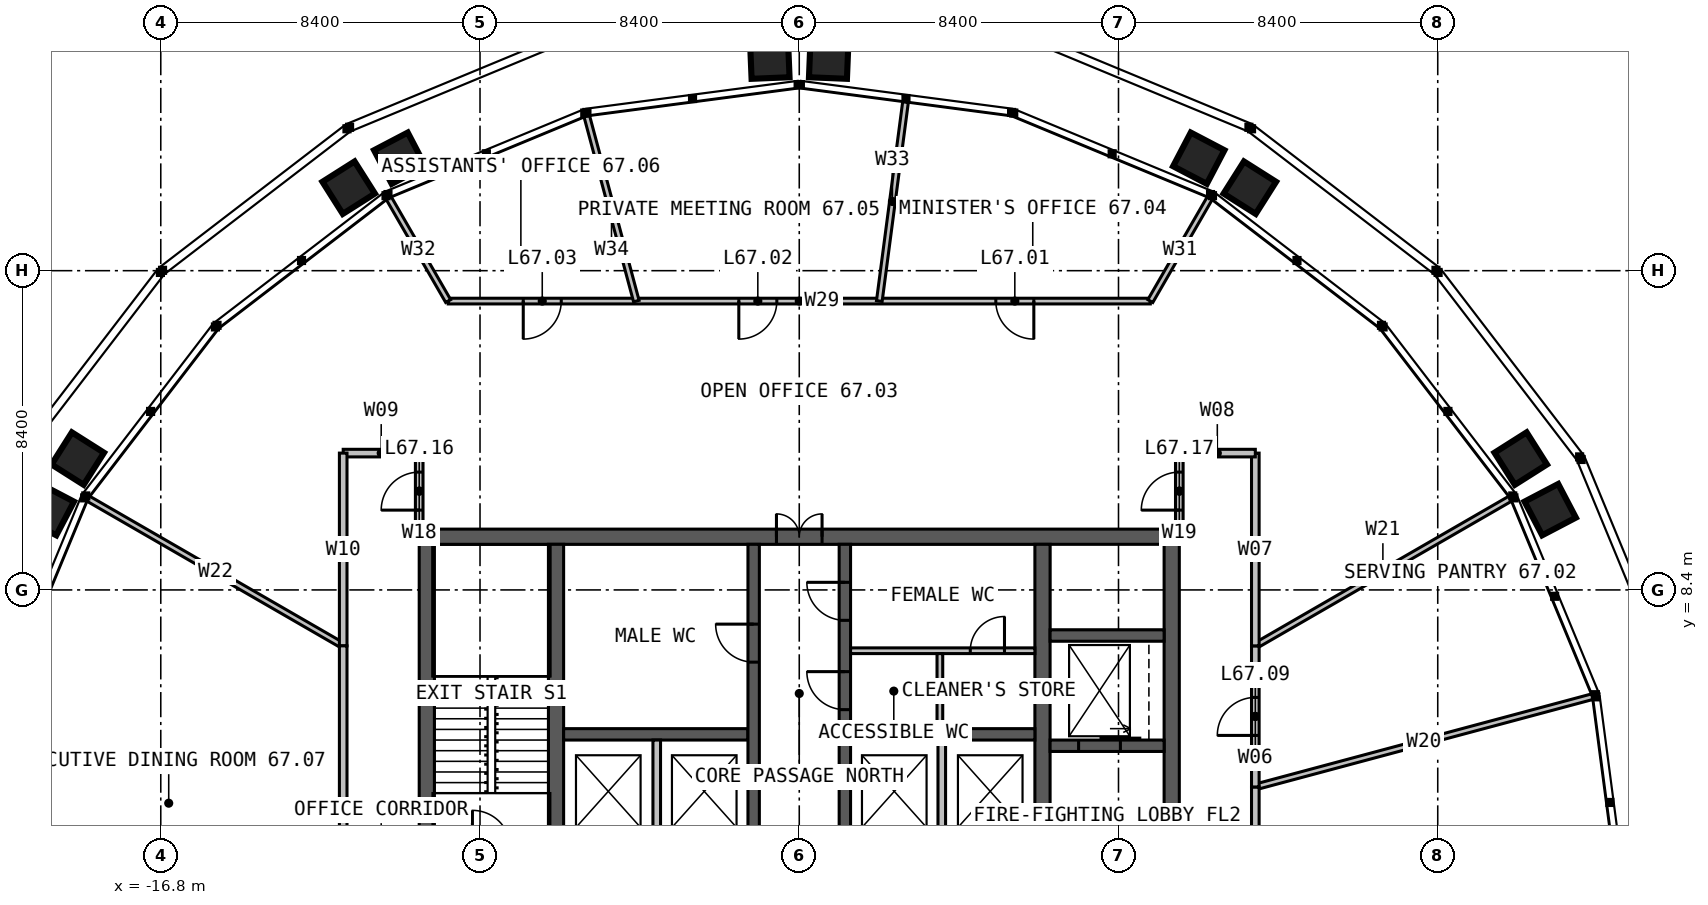
"""IFC4 building model, lengths in metres.
Left out: names, types, materials, properties, quantities, classifications, styles, units other than length and angle.
Written with IfcOpenShell. Run it as: python <this file> out.ifc"""

import sys

from ifc_helpers import new_model, si_unit, direction, frame, frame_2d, origin, place, context, subcontext, project, spatial, rectangle, extrude, element, fill, save


model = new_model("IFC4")
c1 = context("Model", 3, precision=1e-05, world=origin(), true_north=direction((0.0, 1.0)))
c2 = subcontext(c1, "Body", "Model", "MODEL_VIEW")
j1 = project(units=[si_unit("LENGTHUNIT", "METRE"), si_unit("PLANEANGLEUNIT", "RADIAN")], contexts=[c1])
p1 = place(None, origin())
s1 = spatial("IfcSite", under=j1, at=p1, CompositionType="ELEMENT")
p2 = place(p1, origin())
s2 = spatial("IfcBuilding", under=s1, at=p2, CompositionType="ELEMENT")
p3 = place(p2, frame((0.0, 0.0, 276.0)))
s3 = spatial("IfcBuildingStorey", under=s2, at=p3, CompositionType="ELEMENT", Elevation=276.0)
p4 = place(p3, frame((-10.0, 9.8, 0.0), z_axis=(0.0, 0.0, 1.0), x_axis=(1.0, 0.0, 0.0)))
e1 = element("IfcWall", 1, at=p4, inside=s3, PredefinedType="SOLIDWALL", context=c2, shape_type="SweptSolid", body=[
    extrude(rectangle(XDim=20.0, YDim=0.4, at=frame_2d((10.0, 0.0))), origin(), (0.0, 0.0, 1.0), 4.0),
])
p5 = place(p4, frame((9.4, 0.0, 0.0)))
e2 = element("IfcOpeningElement", 2, at=p5, cuts=e1, PredefinedType="OPENING", context=c2, shape_type="SweptSolid", body=[
    extrude(rectangle(XDim=1.2, YDim=2.2, at=frame_2d((0.6, 1.1))), frame((0.0, 0.21, 0.0), z_axis=(0.0, -1.0, 0.0), x_axis=(1.0, 0.0, 0.0)), (0.0, 0.0, 1.0), 0.42),
])
for number, where, z_axis, x_axis in (
    (3, (9.8, -9.6, 0.0), (0.0, 0.0, 1.0), (0.0, 1.0, 0.0)),
    (4, (-9.8, 9.6, 0.0), (0.0, 0.0, 1.0), (0.0, -1.0, 0.0)),
):
    element("IfcWall", number, at=place(p3, frame(where, z_axis=z_axis, x_axis=x_axis)), inside=s3, PredefinedType="SOLIDWALL", context=c2, shape_type="SweptSolid", body=[
        extrude(rectangle(XDim=19.2, YDim=0.4, at=frame_2d((9.6, 0.0))), origin(), (0.0, 0.0, 1.0), 4.0),
    ])
p6 = place(p3, frame((-6.4, -9.6, 0.0), z_axis=(0.0, 0.0, 1.0), x_axis=(0.0, 1.0, 0.0)))
e5 = element("IfcWall", 5, at=p6, inside=s3, PredefinedType="SOLIDWALL", context=c2, shape_type="SweptSolid", body=[
    extrude(rectangle(XDim=19.2, YDim=0.4, at=frame_2d((9.6, 0.0))), origin(), (0.0, 0.0, 1.0), 4.0),
])
p7 = place(p6, frame((9.1, 0.0, 0.0)))
e6 = element("IfcOpeningElement", 6, at=p7, cuts=e5, PredefinedType="OPENING", context=c2, shape_type="SweptSolid", body=[
    extrude(rectangle(XDim=1.0, YDim=2.2, at=frame_2d((0.5, 1.1))), frame((0.0, 0.21, 0.0), z_axis=(0.0, -1.0, 0.0), x_axis=(1.0, 0.0, 0.0)), (0.0, 0.0, 1.0), 0.42),
])
p8 = place(p3, frame((6.4, 9.6, 0.0), z_axis=(0.0, 0.0, 1.0), x_axis=(0.0, -1.0, 0.0)))
e7 = element("IfcWall", 7, at=p8, inside=s3, PredefinedType="SOLIDWALL", context=c2, shape_type="SweptSolid", body=[
    extrude(rectangle(XDim=19.2, YDim=0.4, at=frame_2d((9.6, 0.0))), origin(), (0.0, 0.0, 1.0), 4.0),
])
p9 = place(p8, frame((9.1, 0.0, 0.0)))
e8 = element("IfcOpeningElement", 8, at=p9, cuts=e7, PredefinedType="OPENING", context=c2, shape_type="SweptSolid", body=[
    extrude(rectangle(XDim=1.0, YDim=2.2, at=frame_2d((0.5, 1.1))), frame((0.0, 0.21, 0.0), z_axis=(0.0, -1.0, 0.0), x_axis=(1.0, 0.0, 0.0)), (0.0, 0.0, 1.0), 0.42),
])
for number, where, z_axis, x_axis in (
    (9, (-6.2, 4.6, 0.0), (0.0, 0.0, 1.0), (1.0, 0.0, 0.0)),
    (10, (1.35, 4.6, 0.0), (0.0, 0.0, 1.0), (1.0, 0.0, 0.0)),
):
    element("IfcWall", number, at=place(p3, frame(where, z_axis=z_axis, x_axis=x_axis)), inside=s3, PredefinedType="SOLIDWALL", context=c2, shape_type="SweptSolid", body=[
        extrude(rectangle(XDim=4.85, YDim=0.3, at=frame_2d((2.425, 0.0))), origin(), (0.0, 0.0, 1.0), 4.0),
    ])
p10 = place(p3, frame((-1.2, 1.45, 0.0), z_axis=(0.0, 0.0, 1.0), x_axis=(0.0, 1.0, 0.0)))
e11 = element("IfcWall", 11, at=p10, inside=s3, PredefinedType="SOLIDWALL", context=c2, shape_type="SweptSolid", body=[
    extrude(rectangle(XDim=8.15, YDim=0.3, at=frame_2d((4.075, 0.0))), origin(), (0.0, 0.0, 1.0), 4.0),
])
p11 = place(p10, frame((5.05, 0.0, 0.0)))
e12 = element("IfcOpeningElement", 12, at=p11, cuts=e11, PredefinedType="OPENING", context=c2, shape_type="SweptSolid", body=[
    extrude(rectangle(XDim=1.0, YDim=2.2, at=frame_2d((0.5, 1.1))), frame((0.0, 0.16, 0.0), z_axis=(0.0, -1.0, 0.0), x_axis=(1.0, 0.0, 0.0)), (0.0, 0.0, 1.0), 0.32),
])
p12 = place(p3, frame((1.2, 1.45, 0.0), z_axis=(0.0, 0.0, 1.0), x_axis=(0.0, 1.0, 0.0)))
e13 = element("IfcWall", 13, at=p12, inside=s3, PredefinedType="SOLIDWALL", context=c2, shape_type="SweptSolid", body=[
    extrude(rectangle(XDim=8.15, YDim=0.3, at=frame_2d((4.075, 0.0))), origin(), (0.0, 0.0, 1.0), 4.0),
])
p13 = place(p12, frame((3.8, 0.0, 0.0)))
e14 = element("IfcOpeningElement", 14, at=p13, cuts=e13, PredefinedType="OPENING", context=c2, shape_type="SweptSolid", body=[
    extrude(rectangle(XDim=1.0, YDim=2.2, at=frame_2d((0.5, 1.1))), frame((0.0, 0.16, 0.0), z_axis=(0.0, -1.0, 0.0), x_axis=(1.0, 0.0, 0.0)), (0.0, 0.0, 1.0), 0.32),
])
p14 = place(p12, frame((6.15, 0.0, 0.0)))
e15 = element("IfcOpeningElement", 15, at=p14, cuts=e13, PredefinedType="OPENING", context=c2, shape_type="SweptSolid", body=[
    extrude(rectangle(XDim=1.0, YDim=2.2, at=frame_2d((0.5, 1.1))), frame((0.0, 0.16, 0.0), z_axis=(0.0, -1.0, 0.0), x_axis=(1.0, 0.0, 0.0)), (0.0, 0.0, 1.0), 0.32),
])
p15 = place(p3, frame((6.6, 4.3, 0.0), z_axis=(0.0, 0.0, 1.0), x_axis=(1.0, 0.0, 0.0)))
e16 = element("IfcWall", 16, at=p15, inside=s3, PredefinedType="SOLIDWALL", context=c2, shape_type="SweptSolid", body=[
    extrude(rectangle(XDim=3.0, YDim=0.3, at=frame_2d((1.5, 0.0))), origin(), (0.0, 0.0, 1.0), 4.0),
])
p16 = place(p15, frame((0.75, 0.0, 0.0)))
e17 = element("IfcOpeningElement", 17, at=p16, cuts=e16, PredefinedType="OPENING", context=c2, shape_type="SweptSolid", body=[
    extrude(rectangle(XDim=1.1, YDim=2.2, at=frame_2d((0.55, 1.1))), frame((0.0, 0.16, 0.0), z_axis=(0.0, -1.0, 0.0), x_axis=(1.0, 0.0, 0.0)), (0.0, 0.0, 1.0), 0.32),
])
p17 = place(p3, frame((6.6, 7.2, 0.0), z_axis=(0.0, 0.0, 1.0), x_axis=(1.0, 0.0, 0.0)))
e18 = element("IfcWall", 18, at=p17, inside=s3, PredefinedType="SOLIDWALL", context=c2, shape_type="SweptSolid", body=[
    extrude(rectangle(XDim=3.0, YDim=0.3, at=frame_2d((1.5, 0.0))), origin(), (0.0, 0.0, 1.0), 4.0),
])
for number, where, z_axis, x_axis in (
    (19, (-3.75, 1.75, 0.0), (0.0, 0.0, 1.0), (0.0, 1.0, 0.0)),
    (20, (3.75, 1.75, 0.0), (0.0, 0.0, 1.0), (0.0, 1.0, 0.0)),
):
    element("IfcWall", number, at=place(p3, frame(where, z_axis=z_axis, x_axis=x_axis)), inside=s3, PredefinedType="SOLIDWALL", context=c2, shape_type="SweptSolid", body=[
        extrude(rectangle(XDim=2.7, YDim=0.2, at=frame_2d((1.35, 0.0))), origin(), (0.0, 0.0, 1.0), 3.75),
    ])
p18 = place(p3, frame((1.35, 6.8, 0.0), z_axis=(0.0, 0.0, 1.0), x_axis=(1.0, 0.0, 0.0)))
e21 = element("IfcWall", 21, at=p18, inside=s3, PredefinedType="PARTITIONING", context=c2, shape_type="SweptSolid", body=[
    extrude(rectangle(XDim=4.85, YDim=0.15, at=frame_2d((2.425, 0.0))), origin(), (0.0, 0.0, 1.0), 3.75),
])
p19 = place(p18, frame((3.15, 0.0, 0.0)))
e22 = element("IfcOpeningElement", 22, at=p19, cuts=e21, PredefinedType="OPENING", context=c2, shape_type="SweptSolid", body=[
    extrude(rectangle(XDim=0.9, YDim=2.2, at=frame_2d((0.45, 1.1))), frame((0.0, 0.085, 0.0), z_axis=(0.0, -1.0, 0.0), x_axis=(1.0, 0.0, 0.0)), (0.0, 0.0, 1.0), 0.17),
])
p20 = place(p3, frame((3.7, 4.75, 0.0), z_axis=(0.0, 0.0, 1.0), x_axis=(0.0, 1.0, 0.0)))
e23 = element("IfcWall", 23, at=p20, inside=s3, PredefinedType="PARTITIONING", context=c2, shape_type="SweptSolid", body=[
    extrude(rectangle(XDim=1.975, YDim=0.15, at=frame_2d((0.988, 0.0))), origin(), (0.0, 0.0, 1.0), 3.75),
])
p21 = place(p3, frame((12.0, 3.215, 0.0), z_axis=(0.0, 0.0, 1.0), x_axis=(0.965925864192, 0.258818903647, 0.0)))
e24 = element("IfcWall", 24, at=p21, inside=s3, PredefinedType="PARTITIONING", context=c2, shape_type="SweptSolid", body=[
    extrude(rectangle(XDim=9.185, YDim=0.15, at=frame_2d((4.592, 0.0))), origin(), (0.0, 0.0, 1.0), 2.79),
])
for number, where, z_axis, x_axis in (
    (25, (12.0, 6.928, 0.0), (0.0, 0.0, 1.0), (0.866, 0.5, 0.0)),
    (26, (-12.0, 6.928, 0.0), (0.0, 0.0, 1.0), (-0.866, 0.5, 0.0)),
):
    element("IfcWall", number, at=place(p3, frame(where, z_axis=z_axis, x_axis=x_axis)), inside=s3, PredefinedType="PARTITIONING", context=c2, shape_type="SweptSolid", body=[
        extrude(rectangle(XDim=7.752, YDim=0.15, at=frame_2d((3.876, 0.0))), origin(), (0.0, 0.0, 1.0), 2.79),
    ])
p22 = place(p3, frame((12.0, -6.928, 0.0), z_axis=(0.0, 0.0, 1.0), x_axis=(0.0, 1.0, 0.0)))
e27 = element("IfcWall", 27, at=p22, inside=s3, PredefinedType="PARTITIONING", context=c2, shape_type="SweptSolid", body=[
    extrude(rectangle(XDim=10.144, YDim=0.2, at=frame_2d((5.072, 0.0))), origin(), (0.0, 0.0, 1.0), 3.8),
])
p23 = place(p22, frame((4.172, 0.0, 0.0)))
e28 = element("IfcOpeningElement", 28, at=p23, cuts=e27, PredefinedType="OPENING", context=c2, shape_type="SweptSolid", body=[
    extrude(rectangle(XDim=1.8, YDim=2.2, at=frame_2d((0.9, 1.1))), frame((0.0, 0.11, 0.0), z_axis=(0.0, -1.0, 0.0), x_axis=(1.0, 0.0, 0.0)), (0.0, 0.0, 1.0), 0.22),
])
p24 = place(p3, frame((12.0, 3.215, 0.0), z_axis=(0.0, 0.0, 1.0), x_axis=(0.0, 1.0, 0.0)))
e29 = element("IfcWall", 29, at=p24, inside=s3, PredefinedType="PARTITIONING", context=c2, shape_type="SweptSolid", body=[
    extrude(rectangle(XDim=3.713, YDim=0.2, at=frame_2d((1.856, 0.0))), origin(), (0.0, 0.0, 1.0), 3.8),
])
p25 = place(p24, frame((1.356, 0.0, 0.0)))
e30 = element("IfcOpeningElement", 30, at=p25, cuts=e29, PredefinedType="OPENING", context=c2, shape_type="SweptSolid", body=[
    extrude(rectangle(XDim=1.0, YDim=2.2, at=frame_2d((0.5, 1.1))), frame((0.0, 0.11, 0.0), z_axis=(0.0, -1.0, 0.0), x_axis=(1.0, 0.0, 0.0)), (0.0, 0.0, 1.0), 0.22),
])
p26 = place(p3, frame((12.0, 6.928, 0.0), z_axis=(0.0, 0.0, 1.0), x_axis=(0.0, 1.0, 0.0)))
e31 = element("IfcWall", 31, at=p26, inside=s3, PredefinedType="PARTITIONING", context=c2, shape_type="SweptSolid", body=[
    extrude(rectangle(XDim=5.072, YDim=0.2, at=frame_2d((2.536, 0.0))), origin(), (0.0, 0.0, 1.0), 3.8),
])
p27 = place(p3, frame((12.0, 12.0, 0.0), z_axis=(0.0, 0.0, 1.0), x_axis=(-1.0, 0.0, 0.0)))
e32 = element("IfcWall", 32, at=p27, inside=s3, PredefinedType="PARTITIONING", context=c2, shape_type="SweptSolid", body=[
    extrude(rectangle(XDim=2.0, YDim=0.2, at=frame_2d((1.0, 0.0))), origin(), (0.0, 0.0, 1.0), 3.8),
])
p28 = place(p3, frame((9.238, 16.0, 0.0), z_axis=(0.0, 0.0, 1.0), x_axis=(-1.0, 0.0, 0.0)))
e33 = element("IfcWall", 33, at=p28, inside=s3, PredefinedType="PARTITIONING", context=c2, shape_type="SweptSolid", body=[
    extrude(rectangle(XDim=18.475, YDim=0.15, at=frame_2d((9.238, 0.0))), origin(), (0.0, 0.0, 1.0), 2.79),
])
p29 = place(p28, frame((3.066, 0.0, 0.0)))
e34 = element("IfcOpeningElement", 34, at=p29, cuts=e33, PredefinedType="OPENING", context=c2, shape_type="SweptSolid", body=[
    extrude(rectangle(XDim=1.0, YDim=2.2, at=frame_2d((0.5, 1.1))), frame((0.0, 0.085, 0.0), z_axis=(0.0, -1.0, 0.0), x_axis=(1.0, 0.0, 0.0)), (0.0, 0.0, 1.0), 0.17),
])
p30 = place(p28, frame((9.828, 0.0, 0.0)))
e35 = element("IfcOpeningElement", 35, at=p30, cuts=e33, PredefinedType="OPENING", context=c2, shape_type="SweptSolid", body=[
    extrude(rectangle(XDim=1.0, YDim=2.2, at=frame_2d((0.5, 1.1))), frame((0.0, 0.085, 0.0), z_axis=(0.0, -1.0, 0.0), x_axis=(1.0, 0.0, 0.0)), (0.0, 0.0, 1.0), 0.17),
])
p31 = place(p28, frame((15.5, 0.0, 0.0)))
e36 = element("IfcOpeningElement", 36, at=p31, cuts=e33, PredefinedType="OPENING", context=c2, shape_type="SweptSolid", body=[
    extrude(rectangle(XDim=1.0, YDim=2.2, at=frame_2d((0.5, 1.1))), frame((0.0, 0.085, 0.0), z_axis=(0.0, -1.0, 0.0), x_axis=(1.0, 0.0, 0.0)), (0.0, 0.0, 1.0), 0.17),
])
for number, where, z_axis, x_axis in (
    (37, (9.238, 16.0, 0.0), (0.0, 0.0, 1.0), (0.5, 0.866, 0.0)),
    (38, (-9.238, 16.0, 0.0), (0.0, 0.0, 1.0), (-0.5, 0.866, 0.0)),
):
    element("IfcWall", number, at=place(p3, frame(where, z_axis=z_axis, x_axis=x_axis)), inside=s3, PredefinedType="PARTITIONING", context=c2, shape_type="SweptSolid", body=[
        extrude(rectangle(XDim=3.133, YDim=0.15, at=frame_2d((1.567, 0.0))), origin(), (0.0, 0.0, 1.0), 2.79),
    ])
p32 = place(p3, frame((2.106, 16.0, 0.0), z_axis=(0.0, 0.0, 1.0), x_axis=(0.13054174127, 0.991442814179, 0.0)))
e39 = element("IfcWall", 39, at=p32, inside=s3, PredefinedType="PARTITIONING", context=c2, shape_type="SweptSolid", body=[
    extrude(rectangle(XDim=5.285, YDim=0.15, at=frame_2d((2.643, 0.0))), origin(), (0.0, 0.0, 1.0), 2.79),
])
p33 = place(p3, frame((-4.287, 16.0, 0.0), z_axis=(0.0, 0.0, 1.0), x_axis=(-0.25882238104, 0.965924932421, 0.0)))
e40 = element("IfcWall", 40, at=p33, inside=s3, PredefinedType="PARTITIONING", context=c2, shape_type="SweptSolid", body=[
    extrude(rectangle(XDim=5.044, YDim=0.15, at=frame_2d((2.522, 0.0))), origin(), (0.0, 0.0, 1.0), 2.79),
])
p34 = place(p3, frame((-10.0, 12.0, 0.0), z_axis=(0.0, 0.0, 1.0), x_axis=(-1.0, 0.0, 0.0)))
e41 = element("IfcWall", 41, at=p34, inside=s3, PredefinedType="PARTITIONING", context=c2, shape_type="SweptSolid", body=[
    extrude(rectangle(XDim=2.0, YDim=0.2, at=frame_2d((1.0, 0.0))), origin(), (0.0, 0.0, 1.0), 3.8),
])
p35 = place(p3, frame((-12.0, 12.0, 0.0), z_axis=(0.0, 0.0, 1.0), x_axis=(0.0, -1.0, 0.0)))
e42 = element("IfcWall", 42, at=p35, inside=s3, PredefinedType="PARTITIONING", context=c2, shape_type="SweptSolid", body=[
    extrude(rectangle(XDim=5.072, YDim=0.2, at=frame_2d((2.536, 0.0))), origin(), (0.0, 0.0, 1.0), 3.8),
])
p36 = place(p3, frame((-12.0, 6.928, 0.0), z_axis=(0.0, 0.0, 1.0), x_axis=(0.0, -1.0, 0.0)))
e43 = element("IfcWall", 43, at=p36, inside=s3, PredefinedType="PARTITIONING", context=c2, shape_type="SweptSolid", body=[
    extrude(rectangle(XDim=13.856, YDim=0.2, at=frame_2d((6.928, 0.0))), origin(), (0.0, 0.0, 1.0), 3.8),
])
p37 = place(p36, frame((6.028, 0.0, 0.0)))
e44 = element("IfcOpeningElement", 44, at=p37, cuts=e43, PredefinedType="OPENING", context=c2, shape_type="SweptSolid", body=[
    extrude(rectangle(XDim=1.8, YDim=2.2, at=frame_2d((0.9, 1.1))), frame((0.0, 0.11, 0.0), z_axis=(0.0, -1.0, 0.0), x_axis=(1.0, 0.0, 0.0)), (0.0, 0.0, 1.0), 0.22),
])
p38 = place(p3, frame((-10.0, 10.0, 0.0), z_axis=(0.0, 0.0, 1.0), x_axis=(0.0, 1.0, 0.0)))
e45 = element("IfcWall", 45, at=p38, inside=s3, PredefinedType="PARTITIONING", context=c2, shape_type="SweptSolid", body=[
    extrude(rectangle(XDim=2.0, YDim=0.2, at=frame_2d((1.0, 0.0))), origin(), (0.0, 0.0, 1.0), 3.8),
])
p39 = place(p38, frame((0.5, 0.0, 0.0)))
e46 = element("IfcOpeningElement", 46, at=p39, cuts=e45, PredefinedType="OPENING", context=c2, shape_type="SweptSolid", body=[
    extrude(rectangle(XDim=1.0, YDim=2.2, at=frame_2d((0.5, 1.1))), frame((0.0, 0.11, 0.0), z_axis=(0.0, -1.0, 0.0), x_axis=(1.0, 0.0, 0.0)), (0.0, 0.0, 1.0), 0.22),
])
p40 = place(p3, frame((10.0, 10.0, 0.0), z_axis=(0.0, 0.0, 1.0), x_axis=(0.0, 1.0, 0.0)))
e47 = element("IfcWall", 47, at=p40, inside=s3, PredefinedType="PARTITIONING", context=c2, shape_type="SweptSolid", body=[
    extrude(rectangle(XDim=2.0, YDim=0.2, at=frame_2d((1.0, 0.0))), origin(), (0.0, 0.0, 1.0), 3.8),
])
p41 = place(p40, frame((0.5, 0.0, 0.0)))
e48 = element("IfcOpeningElement", 48, at=p41, cuts=e47, PredefinedType="OPENING", context=c2, shape_type="SweptSolid", body=[
    extrude(rectangle(XDim=1.0, YDim=2.2, at=frame_2d((0.5, 1.1))), frame((0.0, 0.11, 0.0), z_axis=(0.0, -1.0, 0.0), x_axis=(1.0, 0.0, 0.0)), (0.0, 0.0, 1.0), 0.22),
])
p42 = place(p5, origin())
e49 = element("IfcDoor", 49, at=p42, inside=s3, OperationType="DOUBLE_DOOR_SINGLE_SWING", PredefinedType="DOOR", context=c2, shape_type="SweptSolid", body=[
    extrude(rectangle(XDim=1.2, YDim=2.2, at=frame_2d((0.6, 1.1))), frame((0.0, 0.025, 0.0), z_axis=(0.0, -1.0, 0.0), x_axis=(1.0, 0.0, 0.0)), (0.0, 0.0, 1.0), 0.05),
])
fill(e2, e49)
p43 = place(p11, origin())
e50 = element("IfcDoor", 50, at=p43, inside=s3, OperationType="SINGLE_SWING_RIGHT", PredefinedType="DOOR", context=c2, shape_type="SweptSolid", body=[
    extrude(rectangle(XDim=1.0, YDim=2.2, at=frame_2d((0.5, 1.1))), frame((0.0, 0.025, 0.0), z_axis=(0.0, -1.0, 0.0), x_axis=(1.0, 0.0, 0.0)), (0.0, 0.0, 1.0), 0.05),
])
fill(e12, e50)
p44 = place(p13, origin())
e51 = element("IfcDoor", 51, at=p44, inside=s3, OperationType="SINGLE_SWING_RIGHT", PredefinedType="DOOR", context=c2, shape_type="SweptSolid", body=[
    extrude(rectangle(XDim=1.0, YDim=2.2, at=frame_2d((0.5, 1.1))), frame((0.0, 0.025, 0.0), z_axis=(0.0, -1.0, 0.0), x_axis=(1.0, 0.0, 0.0)), (0.0, 0.0, 1.0), 0.05),
])
fill(e14, e51)
p45 = place(p14, origin())
e52 = element("IfcDoor", 52, at=p45, inside=s3, OperationType="SINGLE_SWING_RIGHT", PredefinedType="DOOR", context=c2, shape_type="SweptSolid", body=[
    extrude(rectangle(XDim=1.0, YDim=2.2, at=frame_2d((0.5, 1.1))), frame((0.0, 0.025, 0.0), z_axis=(0.0, -1.0, 0.0), x_axis=(1.0, 0.0, 0.0)), (0.0, 0.0, 1.0), 0.05),
])
fill(e15, e52)
p46 = place(p19, origin())
e53 = element("IfcDoor", 53, at=p46, inside=s3, OperationType="SINGLE_SWING_RIGHT", PredefinedType="DOOR", context=c2, shape_type="SweptSolid", body=[
    extrude(rectangle(XDim=0.9, YDim=2.2, at=frame_2d((0.45, 1.1))), frame((0.0, 0.025, 0.0), z_axis=(0.0, -1.0, 0.0), x_axis=(1.0, 0.0, 0.0)), (0.0, 0.0, 1.0), 0.05),
])
fill(e22, e53)
p47 = place(p16, origin())
e54 = element("IfcDoor", 54, at=p47, inside=s3, OperationType="SLIDING_TO_LEFT", PredefinedType="DOOR", context=c2, shape_type="SweptSolid", body=[
    extrude(rectangle(XDim=1.1, YDim=2.2, at=frame_2d((0.55, 1.1))), frame((0.0, 0.025, 0.0), z_axis=(0.0, -1.0, 0.0), x_axis=(1.0, 0.0, 0.0)), (0.0, 0.0, 1.0), 0.05),
])
fill(e17, e54)
p48 = place(p25, origin())
e55 = element("IfcDoor", 55, at=p48, inside=s3, OperationType="SINGLE_SWING_LEFT", PredefinedType="DOOR", context=c2, shape_type="SweptSolid", body=[
    extrude(rectangle(XDim=1.0, YDim=2.2, at=frame_2d((0.5, 1.1))), frame((0.0, 0.025, 0.0), z_axis=(0.0, -1.0, 0.0), x_axis=(1.0, 0.0, 0.0)), (0.0, 0.0, 1.0), 0.05),
])
fill(e30, e55)
p49 = place(p29, origin())
e56 = element("IfcDoor", 56, at=p49, inside=s3, OperationType="SINGLE_SWING_LEFT", PredefinedType="DOOR", context=c2, shape_type="SweptSolid", body=[
    extrude(rectangle(XDim=1.0, YDim=2.2, at=frame_2d((0.5, 1.1))), frame((0.0, 0.025, 0.0), z_axis=(0.0, -1.0, 0.0), x_axis=(1.0, 0.0, 0.0)), (0.0, 0.0, 1.0), 0.05),
])
fill(e34, e56)
p50 = place(p30, origin())
e57 = element("IfcDoor", 57, at=p50, inside=s3, OperationType="SINGLE_SWING_RIGHT", PredefinedType="DOOR", context=c2, shape_type="SweptSolid", body=[
    extrude(rectangle(XDim=1.0, YDim=2.2, at=frame_2d((0.5, 1.1))), frame((0.0, 0.025, 0.0), z_axis=(0.0, -1.0, 0.0), x_axis=(1.0, 0.0, 0.0)), (0.0, 0.0, 1.0), 0.05),
])
fill(e35, e57)
p51 = place(p31, origin())
e58 = element("IfcDoor", 58, at=p51, inside=s3, OperationType="SINGLE_SWING_RIGHT", PredefinedType="DOOR", context=c2, shape_type="SweptSolid", body=[
    extrude(rectangle(XDim=1.0, YDim=2.2, at=frame_2d((0.5, 1.1))), frame((0.0, 0.025, 0.0), z_axis=(0.0, -1.0, 0.0), x_axis=(1.0, 0.0, 0.0)), (0.0, 0.0, 1.0), 0.05),
])
fill(e36, e58)
p52 = place(p39, origin())
e59 = element("IfcDoor", 59, at=p52, inside=s3, OperationType="SINGLE_SWING_LEFT", PredefinedType="DOOR", context=c2, shape_type="SweptSolid", body=[
    extrude(rectangle(XDim=1.0, YDim=2.2, at=frame_2d((0.5, 1.1))), frame((0.0, 0.025, 0.0), z_axis=(0.0, -1.0, 0.0), x_axis=(1.0, 0.0, 0.0)), (0.0, 0.0, 1.0), 0.05),
])
fill(e46, e59)
p53 = place(p41, origin())
e60 = element("IfcDoor", 60, at=p53, inside=s3, OperationType="SINGLE_SWING_LEFT", PredefinedType="DOOR", context=c2, shape_type="SweptSolid", body=[
    extrude(rectangle(XDim=1.0, YDim=2.2, at=frame_2d((0.5, 1.1))), frame((0.0, 0.025, 0.0), z_axis=(0.0, -1.0, 0.0), x_axis=(1.0, 0.0, 0.0)), (0.0, 0.0, 1.0), 0.05),
])
fill(e48, e60)
save(model, sys.argv[1])
